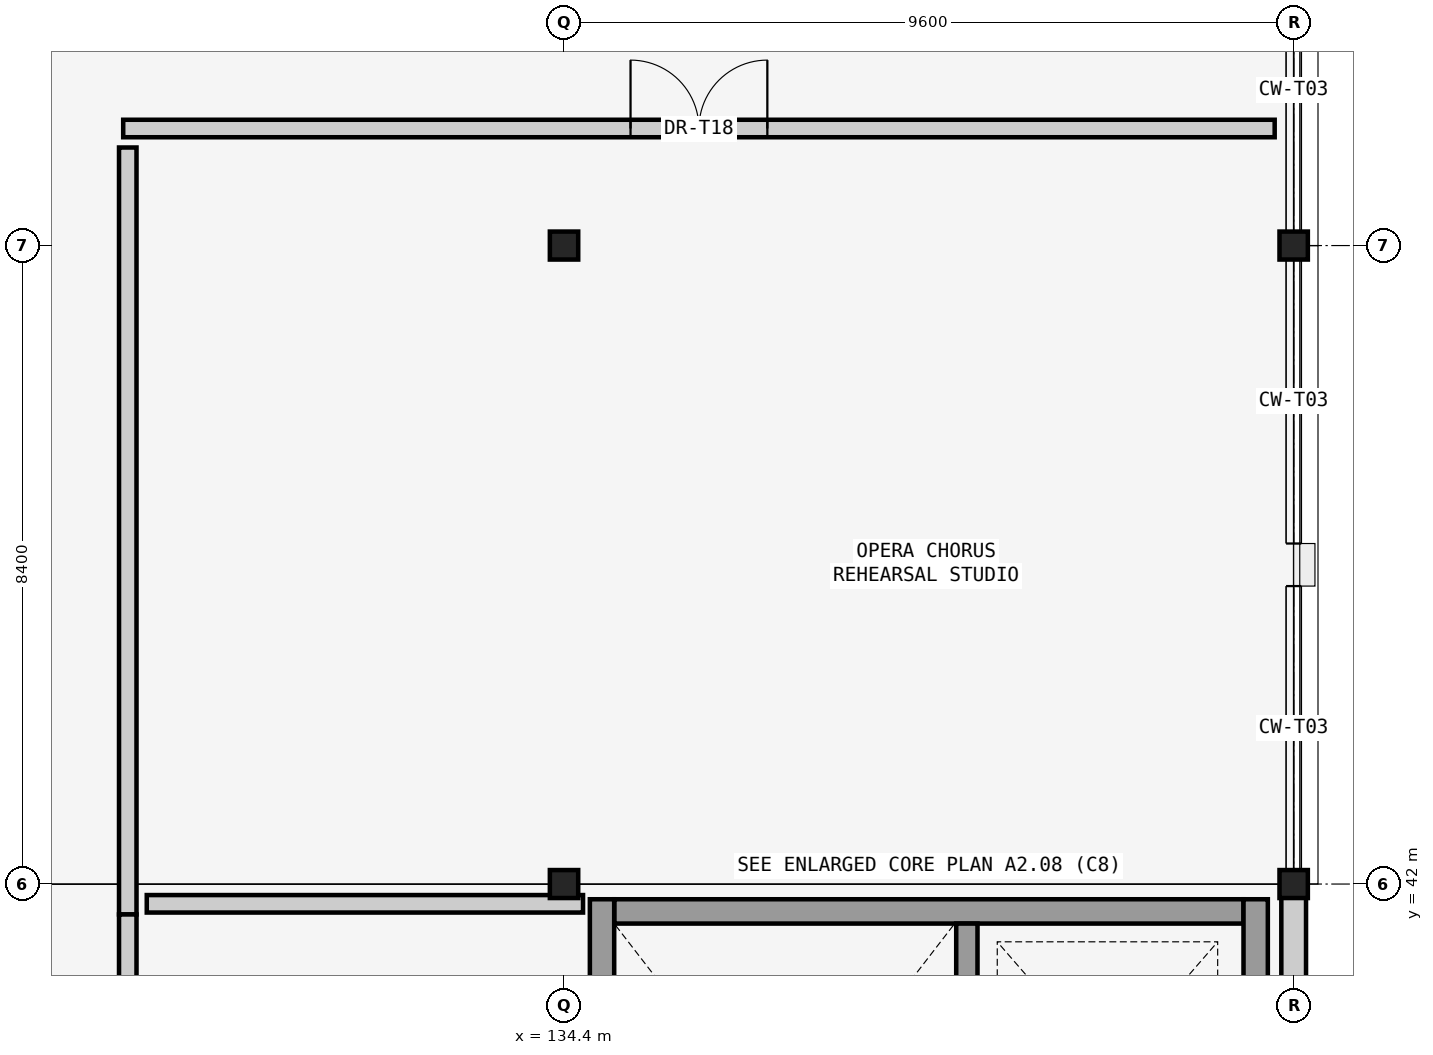
"""IFC4 building model, lengths in metres.
Left out: names, types, materials, properties, quantities, classifications, styles, units other than length and angle.
Written with IfcOpenShell. Run it as: python <this file> out.ifc"""

import sys

from ifc_helpers import new_model, si_unit, direction, frame, frame_2d, origin, origin_2d, place, context, subcontext, project, spatial, rectangle, i_section, extrude, element, fill, save


model = new_model("IFC4")
c1 = context("Model", 3, precision=1e-05, world=origin(), true_north=direction((0.0, 1.0)))
c2 = subcontext(c1, "Body", "Model", "MODEL_VIEW")
j1 = project(units=[si_unit("LENGTHUNIT", "METRE"), si_unit("PLANEANGLEUNIT", "RADIAN")], contexts=[c1])
p1 = place(None, origin())
s1 = spatial("IfcSite", under=j1, at=p1, CompositionType="ELEMENT")
p2 = place(p1, origin())
s2 = spatial("IfcBuilding", under=s1, at=p2, CompositionType="ELEMENT")
p3 = place(p2, frame((0.0, 0.0, 15.0)))
s3 = spatial("IfcBuildingStorey", under=s2, at=p3, CompositionType="ELEMENT", Elevation=15.0)
for number, where, z_axis, x_axis in (
    (1, (134.4, 42.0, 0.0), (0.0, 0.0, 1.0), (1.0, 0.0, 0.0)),
    (2, (134.4, 50.4, 0.0), (0.0, 0.0, 1.0), (1.0, 0.0, 0.0)),
    (3, (144.0, 42.0, 0.0), (0.0, 0.0, 1.0), (1.0, 0.0, 0.0)),
):
    element("IfcColumn", number, at=place(p3, frame(where, z_axis=z_axis, x_axis=x_axis)), inside=s3, PredefinedType="COLUMN", context=c2, shape_type="SweptSolid", body=[
        extrude(i_section(OverallWidth=0.373, OverallDepth=0.368, WebThickness=0.018, FlangeThickness=0.028, at=origin_2d()), origin(), (0.0, 0.0, 1.0), 4.53),
    ])
p4 = place(p3, frame((144.0, 50.4, 0.0), z_axis=(0.0, 0.0, 1.0), x_axis=(1.0, 0.0, 0.0)))
e4 = element("IfcColumn", 4, at=p4, inside=s3, PredefinedType="COLUMN", context=c2, shape_type="SweptSolid", body=[
    extrude(i_section(OverallWidth=0.373, OverallDepth=0.368, WebThickness=0.018, FlangeThickness=0.028, at=origin_2d()), origin(), (0.0, 0.0, 1.0), 4.57),
])
p5 = place(p3, frame((144.0, 41.98, 0.0), z_axis=(0.0, 0.0, 1.0), x_axis=(0.0, -1.0, 0.0)))
e5 = element("IfcWall", 5, at=p5, inside=s3, PredefinedType="SOLIDWALL", context=c2, shape_type="SweptSolid", body=[
    extrude(rectangle(XDim=8.36, YDim=0.325, at=frame_2d((4.18, 0.0))), origin(), (0.0, 0.0, 1.0), 4.178),
])
p6 = place(p3, frame((143.34, 41.64, 0.0), z_axis=(0.0, 0.0, 1.0), x_axis=(-1.0, 0.0, 0.0)))
e6 = element("IfcWall", 6, at=p6, inside=s3, PredefinedType="SHEAR", context=c2, shape_type="SweptSolid", body=[
    extrude(rectangle(XDim=8.28, YDim=0.32, at=frame_2d((4.14, 0.0))), origin(), (0.0, 0.0, 1.0), 4.56),
])
for number, where, z_axis, x_axis in (
    (7, (134.9, 41.8, 0.0), (0.0, 0.0, 1.0), (0.0, -1.0, 0.0)),
    (8, (143.5, 33.44, 0.0), (0.0, 0.0, 1.0), (0.0, 1.0, 0.0)),
):
    element("IfcWall", number, at=place(p3, frame(where, z_axis=z_axis, x_axis=x_axis)), inside=s3, PredefinedType="SHEAR", context=c2, shape_type="SweptSolid", body=[
        extrude(rectangle(XDim=8.36, YDim=0.32, at=frame_2d((4.18, 0.0))), origin(), (0.0, 0.0, 1.0), 4.56),
    ])
p7 = place(p3, frame((139.7, 33.76, 0.0), z_axis=(0.0, 0.0, 1.0), x_axis=(0.0, 1.0, 0.0)))
e9 = element("IfcWall", 9, at=p7, inside=s3, PredefinedType="SHEAR", context=c2, shape_type="SweptSolid", body=[
    extrude(rectangle(XDim=7.72, YDim=0.28, at=frame_2d((3.86, 0.0))), origin(), (0.0, 0.0, 1.0), 4.56),
])
p8 = place(p3, frame((128.6, 51.94, 0.0), z_axis=(0.0, 0.0, 1.0), x_axis=(1.0, 0.0, 0.0)))
e10 = element("IfcWall", 10, at=p8, inside=s3, PredefinedType="SOLIDWALL", context=c2, shape_type="SweptSolid", body=[
    extrude(rectangle(XDim=15.15, YDim=0.23, at=frame_2d((7.575, 0.0))), origin(), (0.0, 0.0, 1.0), 4.45),
])
p9 = place(p8, frame((6.675, 0.0, 0.0)))
e11 = element("IfcOpeningElement", 11, at=p9, cuts=e10, PredefinedType="OPENING", context=c2, shape_type="SweptSolid", body=[
    extrude(rectangle(XDim=1.8, YDim=2.4, at=frame_2d((0.9, 1.2))), frame((0.0, 0.125, 0.0), z_axis=(0.0, -1.0, 0.0), x_axis=(1.0, 0.0, 0.0)), (0.0, 0.0, 1.0), 0.25),
])
p10 = place(p3, frame((128.66, 41.6, 0.0), z_axis=(0.0, 0.0, 1.0), x_axis=(0.0, 1.0, 0.0)))
e12 = element("IfcWall", 12, at=p10, inside=s3, PredefinedType="SOLIDWALL", context=c2, shape_type="SweptSolid", body=[
    extrude(rectangle(XDim=10.09, YDim=0.23, at=frame_2d((5.045, 0.0))), origin(), (0.0, 0.0, 1.0), 4.45),
])
p11 = place(p3, frame((128.66, 33.6, 0.0), z_axis=(0.0, 0.0, 1.0), x_axis=(0.0, 1.0, 0.0)))
e13 = element("IfcWall", 13, at=p11, inside=s3, PredefinedType="SOLIDWALL", context=c2, shape_type="SweptSolid", body=[
    extrude(rectangle(XDim=8.0, YDim=0.23, at=frame_2d((4.0, 0.0))), origin(), (0.0, 0.0, 1.0), 4.45),
])
p12 = place(p11, frame((3.1, 0.0, 0.0)))
e14 = element("IfcOpeningElement", 14, at=p12, cuts=e13, PredefinedType="OPENING", context=c2, shape_type="SweptSolid", body=[
    extrude(rectangle(XDim=1.8, YDim=2.3, at=frame_2d((0.9, 1.15))), frame((0.0, 0.125, 0.0), z_axis=(0.0, -1.0, 0.0), x_axis=(1.0, 0.0, 0.0)), (0.0, 0.0, 1.0), 0.25),
])
p13 = place(p3, frame((128.91, 41.74, 0.0), z_axis=(0.0, 0.0, 1.0), x_axis=(1.0, 0.0, 0.0)))
e15 = element("IfcWall", 15, at=p13, inside=s3, PredefinedType="SOLIDWALL", context=c2, shape_type="SweptSolid", body=[
    extrude(rectangle(XDim=5.74, YDim=0.23, at=frame_2d((2.87, 0.0))), origin(), (0.0, 0.0, 1.0), 4.48),
])
p14 = place(p9, origin())
e16 = element("IfcDoor", 16, at=p14, inside=s3, OperationType="DOUBLE_SWING_LEFT", PredefinedType="DOOR", context=c2, shape_type="SweptSolid", body=[
    extrude(rectangle(XDim=1.8, YDim=2.4, at=frame_2d((0.9, 1.2))), frame((0.0, 0.025, 0.0), z_axis=(0.0, -1.0, 0.0), x_axis=(1.0, 0.0, 0.0)), (0.0, 0.0, 1.0), 0.05),
])
fill(e11, e16)
save(model, sys.argv[1])
